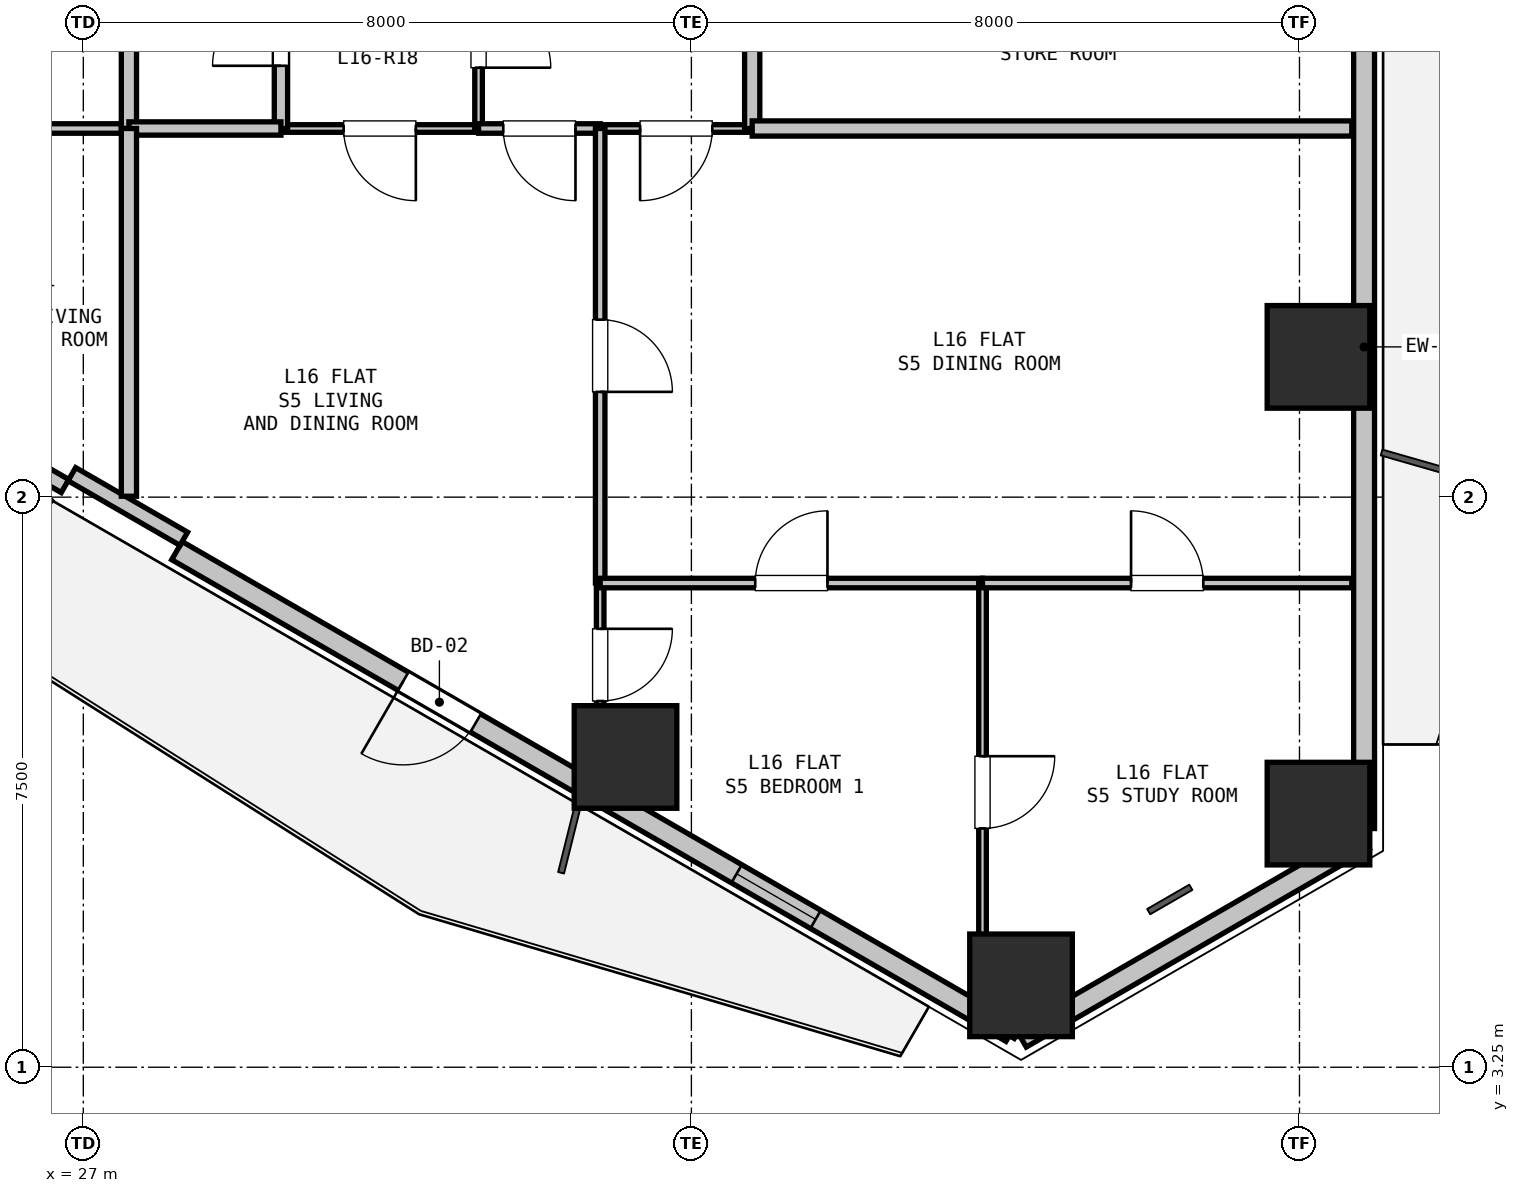
"""IFC4 building model, lengths in metres.
Left out: names, types, materials, properties, quantities, classifications, styles, units other than length and angle.
Written with IfcOpenShell. Run it as: python <this file> out.ifc"""

import sys

from ifc_helpers import new_model, si_unit, direction, frame, frame_2d, origin, origin_2d, place, context, subcontext, project, spatial, rectangle, hollow_rectangle, extrude, element, fill, save


model = new_model("IFC4")
c1 = context("Model", 3, precision=1e-05, world=origin(), true_north=direction((0.0, 1.0)))
c2 = subcontext(c1, "Body", "Model", "MODEL_VIEW")
j1 = project(units=[si_unit("LENGTHUNIT", "METRE"), si_unit("PLANEANGLEUNIT", "RADIAN")], contexts=[c1])
p1 = place(None, origin())
s1 = spatial("IfcSite", under=j1, at=p1, CompositionType="ELEMENT")
p2 = place(p1, origin())
s2 = spatial("IfcBuilding", under=s1, at=p2, CompositionType="ELEMENT")
p3 = place(p2, frame((0.0, 0.0, 58.8)))
s3 = spatial("IfcBuildingStorey", under=s2, at=p3, CompositionType="ELEMENT", Elevation=58.8)
for number, where, z_axis, x_axis in (
    (1, (43.25, 12.595, 0.0), (0.0, 0.0, 1.0), (1.0, 0.0, 0.0)),
    (2, (43.25, 6.587, 0.0), (0.0, 0.0, 1.0), (1.0, 0.0, 0.0)),
    (3, (39.337, 4.327, 0.0), (0.0, 0.0, 1.0), (1.0, 0.0, 0.0)),
    (4, (34.133, 7.332, 0.0), (0.0, 0.0, 1.0), (1.0, 0.0, 0.0)),
):
    element("IfcColumn", number, at=place(p3, frame(where, z_axis=z_axis, x_axis=x_axis)), inside=s3, PredefinedType="COLUMN", context=c2, shape_type="SweptSolid", body=[
        extrude(hollow_rectangle(XDim=1.35, YDim=1.35, WallThickness=0.036, at=origin_2d()), origin(), (0.0, 0.0, 1.0), 3.3),
    ])
p4 = place(p3, frame((43.85, 6.24, 0.0), z_axis=(0.0, 0.0, 1.0), x_axis=(-0.866043601342, -0.499968479581, 0.0)))
e5 = element("IfcWall", 5, at=p4, inside=s3, PredefinedType="SOLIDWALL", context=c2, shape_type="SweptSolid", body=[
    extrude(rectangle(XDim=5.211, YDim=0.275, at=frame_2d((2.605, 0.0))), origin(), (0.0, 0.0, 1.0), 2.64),
])
p5 = place(p3, frame((43.85, 19.063, 0.0), z_axis=(0.0, 0.0, 1.0), x_axis=(0.0, -1.0, 0.0)))
e6 = element("IfcWall", 6, at=p5, inside=s3, PredefinedType="SOLIDWALL", context=c2, shape_type="SweptSolid", body=[
    extrude(rectangle(XDim=12.673, YDim=0.275, at=frame_2d((6.336, 0.0))), origin(), (0.0, 0.0, 1.0), 2.64),
])
p6 = place(p3, frame((39.207, 3.71, 0.0), z_axis=(0.0, 0.0, 1.0), x_axis=(-0.86603192154, 0.499988710747, 0.0)))
e7 = element("IfcWall", 7, at=p6, inside=s3, PredefinedType="SOLIDWALL", context=c2, shape_type="SweptSolid", body=[
    extrude(rectangle(XDim=12.673, YDim=0.275, at=frame_2d((6.336, 0.0))), origin(), (0.0, 0.0, 1.0), 2.64),
])
p7 = place(p6, frame((8.136, 0.0, 0.0)))
e8 = element("IfcOpeningElement", 8, at=p7, cuts=e7, PredefinedType="OPENING", context=c2, shape_type="SweptSolid", body=[
    extrude(rectangle(XDim=1.1, YDim=2.1, at=frame_2d((0.55, 1.05))), frame((0.0, 0.147, 0.0), z_axis=(0.0, -1.0, 0.0), x_axis=(1.0, 0.0, 0.0)), (0.0, 0.0, 1.0), 0.295),
])
p8 = place(p6, frame((2.971, 0.0, 0.9)))
e9 = element("IfcOpeningElement", 9, at=p8, cuts=e7, PredefinedType="OPENING", context=c2, shape_type="SweptSolid", body=[
    extrude(rectangle(XDim=1.2, YDim=1.4, at=frame_2d((0.6, 0.7))), frame((0.0, 0.147, 0.0), z_axis=(0.0, -1.0, 0.0), x_axis=(1.0, 0.0, 0.0)), (0.0, 0.0, 1.0), 0.295),
])
p9 = place(p3, frame((26.76, 10.896, 0.0), z_axis=(0.0, 0.0, 1.0), x_axis=(-0.866027351828, 0.499996625875, 0.0)))
e10 = element("IfcWall", 10, at=p9, inside=s3, PredefinedType="PARAPET", context=c2, shape_type="SweptSolid", body=[
    extrude(rectangle(XDim=11.973, YDim=0.2, at=frame_2d((5.987, 0.0))), origin(), (0.0, 0.0, 1.0), 0.2),
])
p10 = place(p3, frame((28.322, 10.202, 0.0), z_axis=(0.0, 0.0, 1.0), x_axis=(-0.86605165483, 0.499954529098, 0.0)))
e11 = element("IfcWall", 11, at=p10, inside=s3, PredefinedType="PARAPET", context=c2, shape_type="SweptSolid", body=[
    extrude(rectangle(XDim=1.7, YDim=0.2, at=frame_2d((0.85, 0.0))), origin(), (0.0, 0.0, 1.0), 2.64),
])
p11 = place(p3, frame((32.2, 15.6, 0.0), z_axis=(0.0, 0.0, 1.0), x_axis=(-1.0, 0.0, 0.0)))
e12 = element("IfcWall", 12, at=p11, inside=s3, PredefinedType="PARTITIONING", context=c2, shape_type="SweptSolid", body=[
    extrude(rectangle(XDim=2.6, YDim=0.1, at=frame_2d((1.3, 0.0))), origin(), (0.0, 0.0, 1.0), 3.02),
])
p12 = place(p11, frame((0.825, 0.0, 0.0)))
e13 = element("IfcOpeningElement", 13, at=p12, cuts=e12, PredefinedType="OPENING", context=c2, shape_type="SweptSolid", body=[
    extrude(rectangle(XDim=0.95, YDim=2.1, at=frame_2d((0.475, 1.05))), frame((0.0, 0.06, 0.0), z_axis=(0.0, -1.0, 0.0), x_axis=(1.0, 0.0, 0.0)), (0.0, 0.0, 1.0), 0.12),
])
p13 = place(p3, frame((29.6, 15.6, 0.0), z_axis=(0.0, 0.0, 1.0), x_axis=(0.0, 1.0, 0.0)))
e14 = element("IfcWall", 14, at=p13, inside=s3, PredefinedType="PLUMBINGWALL", context=c2, shape_type="SweptSolid", body=[
    extrude(rectangle(XDim=2.55, YDim=0.175, at=frame_2d((1.275, 0.0))), origin(), (0.0, 0.0, 1.0), 3.02),
])
p14 = place(p13, frame((0.825, 0.0, 0.0)))
e15 = element("IfcOpeningElement", 15, at=p14, cuts=e14, PredefinedType="OPENING", context=c2, shape_type="SweptSolid", body=[
    extrude(rectangle(XDim=0.9, YDim=2.1, at=frame_2d((0.45, 1.05))), frame((0.0, 0.097, 0.0), z_axis=(0.0, -1.0, 0.0), x_axis=(1.0, 0.0, 0.0)), (0.0, 0.0, 1.0), 0.195),
])
p15 = place(p3, frame((32.2, 18.15, 0.0), z_axis=(0.0, 0.0, 1.0), x_axis=(0.0, -1.0, 0.0)))
e16 = element("IfcWall", 16, at=p15, inside=s3, PredefinedType="PARTITIONING", context=c2, shape_type="SweptSolid", body=[
    extrude(rectangle(XDim=2.55, YDim=0.1, at=frame_2d((1.275, 0.0))), origin(), (0.0, 0.0, 1.0), 3.02),
])
p16 = place(p15, frame((0.8, 0.0, 0.0)))
e17 = element("IfcOpeningElement", 17, at=p16, cuts=e16, PredefinedType="OPENING", context=c2, shape_type="SweptSolid", body=[
    extrude(rectangle(XDim=0.95, YDim=2.1, at=frame_2d((0.475, 1.05))), frame((0.0, 0.06, 0.0), z_axis=(0.0, -1.0, 0.0), x_axis=(1.0, 0.0, 0.0)), (0.0, 0.0, 1.0), 0.12),
])
p17 = place(p3, frame((27.6, 15.6, 0.0), z_axis=(0.0, 0.0, 1.0), x_axis=(-1.0, 0.0, 0.0)))
e18 = element("IfcWall", 18, at=p17, inside=s3, PredefinedType="PARTITIONING", context=c2, shape_type="SweptSolid", body=[
    extrude(rectangle(XDim=3.2, YDim=0.125, at=frame_2d((1.6, 0.0))), origin(), (0.0, 0.0, 1.0), 2.317),
])
p18 = place(p17, frame((1.125, 0.0, 0.0)))
e19 = element("IfcOpeningElement", 19, at=p18, cuts=e18, PredefinedType="OPENING", context=c2, shape_type="SweptSolid", body=[
    extrude(rectangle(XDim=0.95, YDim=2.1, at=frame_2d((0.475, 1.05))), frame((0.0, 0.073, 0.0), z_axis=(0.0, -1.0, 0.0), x_axis=(1.0, 0.0, 0.0)), (0.0, 0.0, 1.0), 0.145),
])
p19 = place(p3, frame((27.6, 18.15, 0.0), z_axis=(0.0, 0.0, 1.0), x_axis=(0.0, -1.0, 0.0)))
e20 = element("IfcWall", 20, at=p19, inside=s3, PredefinedType="PARTITIONING", context=c2, shape_type="SweptSolid", body=[
    extrude(rectangle(XDim=2.55, YDim=0.2, at=frame_2d((1.275, 0.0))), origin(), (0.0, 0.0, 1.0), 3.02),
])
p20 = place(p3, frame((29.6, 15.6, 0.0), z_axis=(0.0, 0.0, 1.0), x_axis=(-1.0, 0.0, 0.0)))
e21 = element("IfcWall", 21, at=p20, inside=s3, PredefinedType="PLUMBINGWALL", context=c2, shape_type="SweptSolid", body=[
    extrude(rectangle(XDim=2.0, YDim=0.175, at=frame_2d((1.0, 0.0))), origin(), (0.0, 0.0, 1.0), 3.02),
])
p21 = place(p3, frame((35.8, 15.6, 0.0), z_axis=(0.0, 0.0, 1.0), x_axis=(-1.0, 0.0, 0.0)))
e22 = element("IfcWall", 22, at=p21, inside=s3, PredefinedType="PARTITIONING", context=c2, shape_type="SweptSolid", body=[
    extrude(rectangle(XDim=2.0, YDim=0.1, at=frame_2d((1.0, 0.0))), origin(), (0.0, 0.0, 1.0), 3.02),
])
p22 = place(p21, frame((0.525, 0.0, 0.0)))
e23 = element("IfcOpeningElement", 23, at=p22, cuts=e22, PredefinedType="OPENING", context=c2, shape_type="SweptSolid", body=[
    extrude(rectangle(XDim=0.95, YDim=2.1, at=frame_2d((0.475, 1.05))), frame((0.0, 0.06, 0.0), z_axis=(0.0, -1.0, 0.0), x_axis=(1.0, 0.0, 0.0)), (0.0, 0.0, 1.0), 0.12),
])
p23 = place(p3, frame((33.8, 15.6, 0.0), z_axis=(0.0, 0.0, 1.0), x_axis=(-1.0, 0.0, 0.0)))
e24 = element("IfcWall", 24, at=p23, inside=s3, PredefinedType="PARTITIONING", context=c2, shape_type="SweptSolid", body=[
    extrude(rectangle(XDim=1.6, YDim=0.125, at=frame_2d((0.8, 0.0))), origin(), (0.0, 0.0, 1.0), 3.02),
])
p24 = place(p23, frame((0.325, 0.0, 0.0)))
e25 = element("IfcOpeningElement", 25, at=p24, cuts=e24, PredefinedType="OPENING", context=c2, shape_type="SweptSolid", body=[
    extrude(rectangle(XDim=0.95, YDim=2.1, at=frame_2d((0.475, 1.05))), frame((0.0, 0.073, 0.0), z_axis=(0.0, -1.0, 0.0), x_axis=(1.0, 0.0, 0.0)), (0.0, 0.0, 1.0), 0.145),
])
p25 = place(p3, frame((35.8, 18.15, 0.0), z_axis=(0.0, 0.0, 1.0), x_axis=(0.0, -1.0, 0.0)))
e26 = element("IfcWall", 26, at=p25, inside=s3, PredefinedType="PARTITIONING", context=c2, shape_type="SweptSolid", body=[
    extrude(rectangle(XDim=2.55, YDim=0.2, at=frame_2d((1.275, 0.0))), origin(), (0.0, 0.0, 1.0), 3.02),
])
p26 = place(p3, frame((43.688, 15.6, 0.0), z_axis=(0.0, 0.0, 1.0), x_axis=(-1.0, 0.0, 0.0)))
e27 = element("IfcWall", 27, at=p26, inside=s3, PredefinedType="PARTITIONING", context=c2, shape_type="SweptSolid", body=[
    extrude(rectangle(XDim=7.888, YDim=0.2, at=frame_2d((3.944, 0.0))), origin(), (0.0, 0.0, 1.0), 2.317),
])
p27 = place(p3, frame((27.6, 15.6, 0.0), z_axis=(0.0, 0.0, 1.0), x_axis=(0.0, -1.0, 0.0)))
e28 = element("IfcWall", 28, at=p27, inside=s3, PredefinedType="PARTITIONING", context=c2, shape_type="SweptSolid", body=[
    extrude(rectangle(XDim=4.838, YDim=0.2, at=frame_2d((2.419, 0.0))), origin(), (0.0, 0.0, 1.0), 2.317),
])
p28 = place(p3, frame((33.8, 15.6, 0.0), z_axis=(0.0, 0.0, 1.0), x_axis=(0.0, -1.0, 0.0)))
e29 = element("IfcWall", 29, at=p28, inside=s3, PredefinedType="PARTITIONING", context=c2, shape_type="SweptSolid", body=[
    extrude(rectangle(XDim=5.98, YDim=0.125, at=frame_2d((2.99, 0.0))), origin(), (0.0, 0.0, 1.0), 3.02),
])
p29 = place(p28, frame((2.515, 0.0, 0.0)))
e30 = element("IfcOpeningElement", 30, at=p29, cuts=e29, PredefinedType="OPENING", context=c2, shape_type="SweptSolid", body=[
    extrude(rectangle(XDim=0.95, YDim=2.1, at=frame_2d((0.475, 1.05))), frame((0.0, 0.073, 0.0), z_axis=(0.0, -1.0, 0.0), x_axis=(1.0, 0.0, 0.0)), (0.0, 0.0, 1.0), 0.145),
])
p30 = place(p3, frame((33.8, 9.62, 0.0), z_axis=(0.0, 0.0, 1.0), x_axis=(0.0, -1.0, 0.0)))
e31 = element("IfcWall", 31, at=p30, inside=s3, PredefinedType="PARTITIONING", context=c2, shape_type="SweptSolid", body=[
    extrude(rectangle(XDim=2.602, YDim=0.1, at=frame_2d((1.301, 0.0))), origin(), (0.0, 0.0, 1.0), 2.317),
])
p31 = place(p30, frame((0.602, 0.0, 0.0)))
e32 = element("IfcOpeningElement", 32, at=p31, cuts=e31, PredefinedType="OPENING", context=c2, shape_type="SweptSolid", body=[
    extrude(rectangle(XDim=0.95, YDim=2.1, at=frame_2d((0.475, 1.05))), frame((0.0, 0.06, 0.0), z_axis=(0.0, -1.0, 0.0), x_axis=(1.0, 0.0, 0.0)), (0.0, 0.0, 1.0), 0.12),
])
p32 = place(p3, frame((33.8, 9.62, 0.0), z_axis=(0.0, 0.0, 1.0), x_axis=(1.0, 0.0, 0.0)))
e33 = element("IfcWall", 33, at=p32, inside=s3, PredefinedType="PARTITIONING", context=c2, shape_type="SweptSolid", body=[
    extrude(rectangle(XDim=5.03, YDim=0.125, at=frame_2d((2.515, 0.0))), origin(), (0.0, 0.0, 1.0), 3.02),
])
p33 = place(p32, frame((2.04, 0.0, 0.0)))
e34 = element("IfcOpeningElement", 34, at=p33, cuts=e33, PredefinedType="OPENING", context=c2, shape_type="SweptSolid", body=[
    extrude(rectangle(XDim=0.95, YDim=2.1, at=frame_2d((0.475, 1.05))), frame((0.0, 0.073, 0.0), z_axis=(0.0, -1.0, 0.0), x_axis=(1.0, 0.0, 0.0)), (0.0, 0.0, 1.0), 0.145),
])
p34 = place(p3, frame((38.83, 9.62, 0.0), z_axis=(0.0, 0.0, 1.0), x_axis=(0.0, -1.0, 0.0)))
e35 = element("IfcWall", 35, at=p34, inside=s3, PredefinedType="PARTITIONING", context=c2, shape_type="SweptSolid", body=[
    extrude(rectangle(XDim=5.506, YDim=0.1, at=frame_2d((2.753, 0.0))), origin(), (0.0, 0.0, 1.0), 2.63),
])
p35 = place(p34, frame((2.278, 0.0, 0.0)))
e36 = element("IfcOpeningElement", 36, at=p35, cuts=e35, PredefinedType="OPENING", context=c2, shape_type="SweptSolid", body=[
    extrude(rectangle(XDim=0.95, YDim=2.1, at=frame_2d((0.475, 1.05))), frame((0.0, 0.06, 0.0), z_axis=(0.0, -1.0, 0.0), x_axis=(1.0, 0.0, 0.0)), (0.0, 0.0, 1.0), 0.12),
])
p36 = place(p3, frame((38.83, 9.62, 0.0), z_axis=(0.0, 0.0, 1.0), x_axis=(1.0, 0.0, 0.0)))
e37 = element("IfcWall", 37, at=p36, inside=s3, PredefinedType="PARTITIONING", context=c2, shape_type="SweptSolid", body=[
    extrude(rectangle(XDim=4.858, YDim=0.125, at=frame_2d((2.429, 0.0))), origin(), (0.0, 0.0, 1.0), 2.317),
])
p37 = place(p36, frame((1.954, 0.0, 0.0)))
e38 = element("IfcOpeningElement", 38, at=p37, cuts=e37, PredefinedType="OPENING", context=c2, shape_type="SweptSolid", body=[
    extrude(rectangle(XDim=0.95, YDim=2.1, at=frame_2d((0.475, 1.05))), frame((0.0, 0.073, 0.0), z_axis=(0.0, -1.0, 0.0), x_axis=(1.0, 0.0, 0.0)), (0.0, 0.0, 1.0), 0.145),
])
p38 = place(p3, frame((39.272, 3.672, 0.0), z_axis=(0.0, 0.0, 1.0), x_axis=(-0.866442544969, 0.49927679324, 0.0)))
e39 = element("IfcWall", 39, at=p38, inside=s3, PredefinedType="PARTITIONING", context=c2, shape_type="SweptSolid", body=[
    extrude(rectangle(XDim=0.142, YDim=0.1, at=frame_2d((0.071, 0.0))), origin(), (0.0, 0.0, 1.0), 3.02),
])
p39 = place(p7, origin())
e40 = element("IfcDoor", 40, at=p39, inside=s3, OperationType="SINGLE_SWING_RIGHT", PredefinedType="DOOR", context=c2, shape_type="SweptSolid", body=[
    extrude(rectangle(XDim=1.1, YDim=2.1, at=frame_2d((0.55, 1.05))), frame((0.0, 0.025, 0.0), z_axis=(0.0, -1.0, 0.0), x_axis=(1.0, 0.0, 0.0)), (0.0, 0.0, 1.0), 0.05),
])
fill(e8, e40)
p40 = place(p8, origin())
e41 = element("IfcWindow", 41, at=p40, inside=s3, PartitioningType="SINGLE_PANEL", PredefinedType="WINDOW", context=c2, shape_type="SweptSolid", body=[
    extrude(rectangle(XDim=1.2, YDim=1.4, at=frame_2d((0.6, 0.7))), frame((0.0, 0.03, 0.0), z_axis=(0.0, -1.0, 0.0), x_axis=(1.0, 0.0, 0.0)), (0.0, 0.0, 1.0), 0.06),
])
fill(e9, e41)
p41 = place(p14, origin())
e42 = element("IfcDoor", 42, at=p41, inside=s3, OperationType="SINGLE_SWING_LEFT", PredefinedType="DOOR", context=c2, shape_type="SweptSolid", body=[
    extrude(rectangle(XDim=0.9, YDim=2.1, at=frame_2d((0.45, 1.05))), frame((0.0, 0.025, 0.0), z_axis=(0.0, -1.0, 0.0), x_axis=(1.0, 0.0, 0.0)), (0.0, 0.0, 1.0), 0.05),
])
fill(e15, e42)
p42 = place(p16, origin())
e43 = element("IfcDoor", 43, at=p42, inside=s3, OperationType="SINGLE_SWING_RIGHT", PredefinedType="DOOR", context=c2, shape_type="SweptSolid", body=[
    extrude(rectangle(XDim=0.95, YDim=2.1, at=frame_2d((0.475, 1.05))), frame((0.0, 0.025, 0.0), z_axis=(0.0, -1.0, 0.0), x_axis=(1.0, 0.0, 0.0)), (0.0, 0.0, 1.0), 0.05),
])
fill(e17, e43)
p43 = place(p12, origin())
e44 = element("IfcDoor", 44, at=p43, inside=s3, OperationType="SINGLE_SWING_LEFT", PredefinedType="DOOR", context=c2, shape_type="SweptSolid", body=[
    extrude(rectangle(XDim=0.95, YDim=2.1, at=frame_2d((0.475, 1.05))), frame((0.0, 0.025, 0.0), z_axis=(0.0, -1.0, 0.0), x_axis=(1.0, 0.0, 0.0)), (0.0, 0.0, 1.0), 0.05),
])
fill(e13, e44)
p44 = place(p24, origin())
e45 = element("IfcDoor", 45, at=p44, inside=s3, OperationType="SINGLE_SWING_LEFT", PredefinedType="DOOR", context=c2, shape_type="SweptSolid", body=[
    extrude(rectangle(XDim=0.95, YDim=2.1, at=frame_2d((0.475, 1.05))), frame((0.0, 0.025, 0.0), z_axis=(0.0, -1.0, 0.0), x_axis=(1.0, 0.0, 0.0)), (0.0, 0.0, 1.0), 0.05),
])
fill(e25, e45)
p45 = place(p22, origin())
e46 = element("IfcDoor", 46, at=p45, inside=s3, OperationType="SINGLE_SWING_RIGHT", PredefinedType="DOOR", context=c2, shape_type="SweptSolid", body=[
    extrude(rectangle(XDim=0.95, YDim=2.1, at=frame_2d((0.475, 1.05))), frame((0.0, 0.025, 0.0), z_axis=(0.0, -1.0, 0.0), x_axis=(1.0, 0.0, 0.0)), (0.0, 0.0, 1.0), 0.05),
])
fill(e23, e46)
p46 = place(p31, origin())
e47 = element("IfcDoor", 47, at=p46, inside=s3, OperationType="SINGLE_SWING_LEFT", PredefinedType="DOOR", context=c2, shape_type="SweptSolid", body=[
    extrude(rectangle(XDim=0.95, YDim=2.1, at=frame_2d((0.475, 1.05))), frame((0.0, 0.025, 0.0), z_axis=(0.0, -1.0, 0.0), x_axis=(1.0, 0.0, 0.0)), (0.0, 0.0, 1.0), 0.05),
])
fill(e32, e47)
p47 = place(p29, origin())
e48 = element("IfcDoor", 48, at=p47, inside=s3, OperationType="SINGLE_SWING_RIGHT", PredefinedType="DOOR", context=c2, shape_type="SweptSolid", body=[
    extrude(rectangle(XDim=0.95, YDim=2.1, at=frame_2d((0.475, 1.05))), frame((0.0, 0.025, 0.0), z_axis=(0.0, -1.0, 0.0), x_axis=(1.0, 0.0, 0.0)), (0.0, 0.0, 1.0), 0.05),
])
fill(e30, e48)
p48 = place(p35, origin())
e49 = element("IfcDoor", 49, at=p48, inside=s3, OperationType="SINGLE_SWING_LEFT", PredefinedType="DOOR", context=c2, shape_type="SweptSolid", body=[
    extrude(rectangle(XDim=0.95, YDim=2.1, at=frame_2d((0.475, 1.05))), frame((0.0, 0.025, 0.0), z_axis=(0.0, -1.0, 0.0), x_axis=(1.0, 0.0, 0.0)), (0.0, 0.0, 1.0), 0.05),
])
fill(e36, e49)
p49 = place(p33, origin())
e50 = element("IfcDoor", 50, at=p49, inside=s3, OperationType="SINGLE_SWING_RIGHT", PredefinedType="DOOR", context=c2, shape_type="SweptSolid", body=[
    extrude(rectangle(XDim=0.95, YDim=2.1, at=frame_2d((0.475, 1.05))), frame((0.0, 0.025, 0.0), z_axis=(0.0, -1.0, 0.0), x_axis=(1.0, 0.0, 0.0)), (0.0, 0.0, 1.0), 0.05),
])
fill(e34, e50)
p50 = place(p37, origin())
e51 = element("IfcDoor", 51, at=p50, inside=s3, OperationType="SINGLE_SWING_LEFT", PredefinedType="DOOR", context=c2, shape_type="SweptSolid", body=[
    extrude(rectangle(XDim=0.95, YDim=2.1, at=frame_2d((0.475, 1.05))), frame((0.0, 0.025, 0.0), z_axis=(0.0, -1.0, 0.0), x_axis=(1.0, 0.0, 0.0)), (0.0, 0.0, 1.0), 0.05),
])
fill(e38, e51)
save(model, sys.argv[1])
